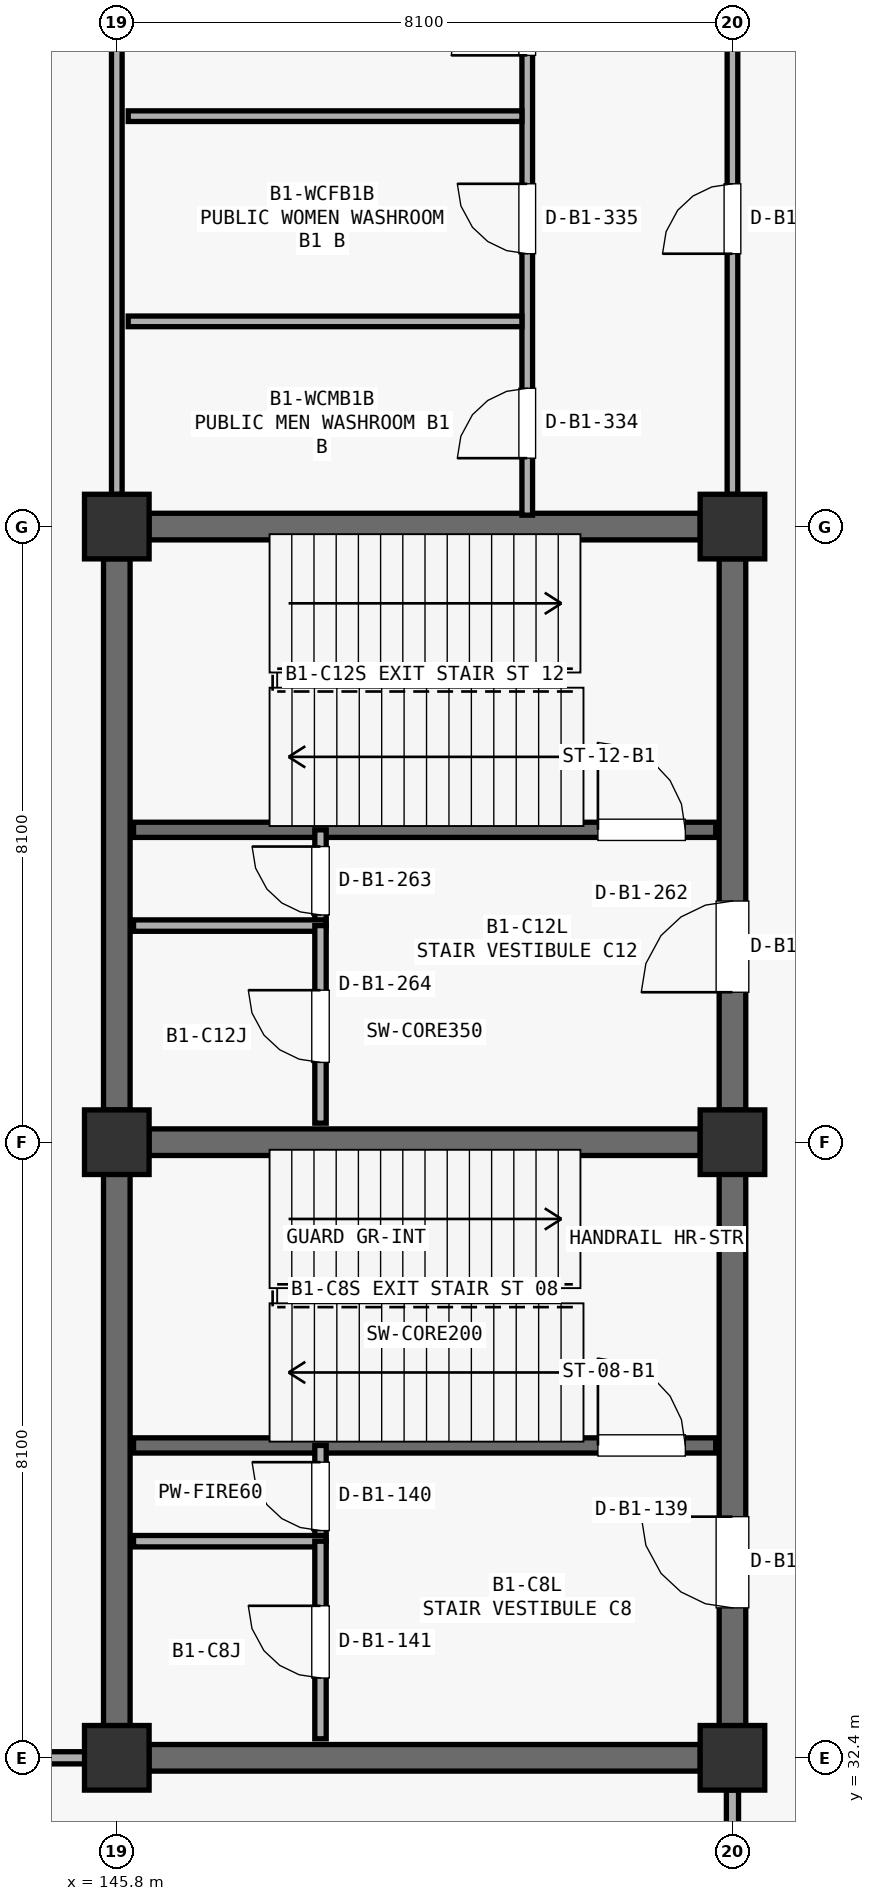
"""IFC4 building model, lengths in metres.
Left out: names, types, materials, properties, quantities, classifications, styles, units other than length and angle.
Written with IfcOpenShell. Run it as: python <this file> out.ifc"""

import sys

from ifc_helpers import new_model, si_unit, direction, frame, frame_2d, origin, origin_2d, place, context, subcontext, project, spatial, rectangle, extrude, element, fill, save


model = new_model("IFC4")
c1 = context("Model", 3, precision=1e-05, world=origin(), true_north=direction((0.0, 1.0)))
c2 = subcontext(c1, "Body", "Model", "MODEL_VIEW")
j1 = project(units=[si_unit("LENGTHUNIT", "METRE"), si_unit("PLANEANGLEUNIT", "RADIAN")], contexts=[c1])
p1 = place(None, origin())
s1 = spatial("IfcSite", under=j1, at=p1, CompositionType="ELEMENT")
p2 = place(p1, origin())
s2 = spatial("IfcBuilding", under=s1, at=p2, CompositionType="ELEMENT")
p3 = place(p2, frame((0.0, 0.0, -5.1)))
s3 = spatial("IfcBuildingStorey", under=s2, at=p3, CompositionType="ELEMENT", Elevation=-5.1)
for number, where, z_axis, x_axis in (
    (1, (145.8, 32.4, 0.0), (0.0, 0.0, 1.0), (1.0, 0.0, 0.0)),
    (2, (145.8, 40.5, 0.0), (0.0, 0.0, 1.0), (1.0, 0.0, 0.0)),
    (3, (145.8, 48.6, 0.0), (0.0, 0.0, 1.0), (1.0, 0.0, 0.0)),
    (4, (153.9, 32.4, 0.0), (0.0, 0.0, 1.0), (1.0, 0.0, 0.0)),
    (5, (153.9, 40.5, 0.0), (0.0, 0.0, 1.0), (1.0, 0.0, 0.0)),
    (6, (153.9, 48.6, 0.0), (0.0, 0.0, 1.0), (1.0, 0.0, 0.0)),
):
    element("IfcColumn", number, at=place(p3, frame(where, z_axis=z_axis, x_axis=x_axis)), inside=s3, PredefinedType="COLUMN", context=c2, shape_type="SweptSolid", body=[
        extrude(rectangle(XDim=0.85, YDim=0.85, at=origin_2d()), origin(), (0.0, 0.0, 1.0), 5.1),
    ])
p4 = place(p3, frame((146.223, 40.5, 0.0), z_axis=(0.0, 0.0, 1.0), x_axis=(1.0, 0.0, 0.0)))
e7 = element("IfcWall", 7, at=p4, inside=s3, PredefinedType="SHEAR", context=c2, shape_type="SweptSolid", body=[
    extrude(rectangle(XDim=7.254, YDim=0.35, at=frame_2d((3.627, 0.0))), origin(), (0.0, 0.0, 1.0), 4.782),
])
p5 = place(p3, frame((145.8, 32.823, 0.0), z_axis=(0.0, 0.0, 1.0), x_axis=(0.0, 1.0, 0.0)))
e8 = element("IfcWall", 8, at=p5, inside=s3, PredefinedType="SHEAR", context=c2, shape_type="SweptSolid", body=[
    extrude(rectangle(XDim=7.254, YDim=0.35, at=frame_2d((3.627, 0.0))), origin(), (0.0, 0.0, 1.0), 4.782),
])
p6 = place(p3, frame((153.9, 32.823, 0.0), z_axis=(0.0, 0.0, 1.0), x_axis=(0.0, 1.0, 0.0)))
e9 = element("IfcWall", 9, at=p6, inside=s3, PredefinedType="SHEAR", context=c2, shape_type="SweptSolid", body=[
    extrude(rectangle(XDim=7.254, YDim=0.35, at=frame_2d((3.627, 0.0))), origin(), (0.0, 0.0, 1.0), 4.782),
])
p7 = place(p6, frame((1.55, 0.0, 0.0)))
e10 = element("IfcOpeningElement", 10, at=p7, cuts=e9, PredefinedType="OPENING", context=c2, shape_type="SweptSolid", body=[
    extrude(rectangle(XDim=1.2, YDim=2.2, at=frame_2d((0.6, 1.1))), frame((0.0, 0.185, 0.0), z_axis=(0.0, -1.0, 0.0), x_axis=(1.0, 0.0, 0.0)), (0.0, 0.0, 1.0), 0.37),
])
p8 = place(p3, frame((146.223, 32.4, 0.0), z_axis=(0.0, 0.0, 1.0), x_axis=(1.0, 0.0, 0.0)))
e11 = element("IfcWall", 11, at=p8, inside=s3, PredefinedType="SHEAR", context=c2, shape_type="SweptSolid", body=[
    extrude(rectangle(XDim=7.254, YDim=0.35, at=frame_2d((3.627, 0.0))), origin(), (0.0, 0.0, 1.0), 4.782),
])
p9 = place(p3, frame((146.02, 36.51, 0.0), z_axis=(0.0, 0.0, 1.0), x_axis=(1.0, 0.0, 0.0)))
e12 = element("IfcWall", 12, at=p9, inside=s3, PredefinedType="SHEAR", context=c2, shape_type="SweptSolid", body=[
    extrude(rectangle(XDim=7.66, YDim=0.2, at=frame_2d((3.83, 0.0))), origin(), (0.0, 0.0, 1.0), 4.782),
])
p10 = place(p9, frame((6.11, 0.0, 0.0)))
e13 = element("IfcOpeningElement", 13, at=p10, cuts=e12, PredefinedType="OPENING", context=c2, shape_type="SweptSolid", body=[
    extrude(rectangle(XDim=1.15, YDim=2.2, at=frame_2d((0.575, 1.1))), frame((0.0, 0.11, 0.0), z_axis=(0.0, -1.0, 0.0), x_axis=(1.0, 0.0, 0.0)), (0.0, 0.0, 1.0), 0.22),
])
p11 = place(p3, frame((148.48, 35.25, 0.0), z_axis=(0.0, 0.0, 1.0), x_axis=(0.0, 1.0, 0.0)))
e14 = element("IfcWall", 14, at=p11, inside=s3, PredefinedType="PARTITIONING", context=c2, shape_type="SweptSolid", body=[
    extrude(rectangle(XDim=1.26, YDim=0.15, at=frame_2d((0.63, 0.0))), origin(), (0.0, 0.0, 1.0), 4.782),
])
p12 = place(p11, frame((0.14, 0.0, 0.0)))
e15 = element("IfcOpeningElement", 15, at=p12, cuts=e14, PredefinedType="OPENING", context=c2, shape_type="SweptSolid", body=[
    extrude(rectangle(XDim=0.9, YDim=2.15, at=frame_2d((0.45, 1.075))), frame((0.0, 0.085, 0.0), z_axis=(0.0, -1.0, 0.0), x_axis=(1.0, 0.0, 0.0)), (0.0, 0.0, 1.0), 0.17),
])
p13 = place(p3, frame((146.02, 35.25, 0.0), z_axis=(0.0, 0.0, 1.0), x_axis=(1.0, 0.0, 0.0)))
e16 = element("IfcWall", 16, at=p13, inside=s3, PredefinedType="PARTITIONING", context=c2, shape_type="SweptSolid", body=[
    extrude(rectangle(XDim=2.53, YDim=0.15, at=frame_2d((1.265, 0.0))), origin(), (0.0, 0.0, 1.0), 4.782),
])
p14 = place(p3, frame((148.48, 32.65, 0.0), z_axis=(0.0, 0.0, 1.0), x_axis=(0.0, 1.0, 0.0)))
e17 = element("IfcWall", 17, at=p14, inside=s3, PredefinedType="PARTITIONING", context=c2, shape_type="SweptSolid", body=[
    extrude(rectangle(XDim=2.6, YDim=0.15, at=frame_2d((1.3, 0.0))), origin(), (0.0, 0.0, 1.0), 4.782),
])
p15 = place(p14, frame((0.8, 0.0, 0.0)))
e18 = element("IfcOpeningElement", 18, at=p15, cuts=e17, PredefinedType="OPENING", context=c2, shape_type="SweptSolid", body=[
    extrude(rectangle(XDim=0.95, YDim=2.15, at=frame_2d((0.475, 1.075))), frame((0.0, 0.085, 0.0), z_axis=(0.0, -1.0, 0.0), x_axis=(1.0, 0.0, 0.0)), (0.0, 0.0, 1.0), 0.17),
])
p16 = place(p3, frame((146.223, 48.6, 0.0), z_axis=(0.0, 0.0, 1.0), x_axis=(1.0, 0.0, 0.0)))
e19 = element("IfcWall", 19, at=p16, inside=s3, PredefinedType="SHEAR", context=c2, shape_type="SweptSolid", body=[
    extrude(rectangle(XDim=7.254, YDim=0.35, at=frame_2d((3.627, 0.0))), origin(), (0.0, 0.0, 1.0), 4.782),
])
p17 = place(p3, frame((145.8, 40.923, 0.0), z_axis=(0.0, 0.0, 1.0), x_axis=(0.0, 1.0, 0.0)))
e20 = element("IfcWall", 20, at=p17, inside=s3, PredefinedType="SHEAR", context=c2, shape_type="SweptSolid", body=[
    extrude(rectangle(XDim=7.254, YDim=0.35, at=frame_2d((3.627, 0.0))), origin(), (0.0, 0.0, 1.0), 4.782),
])
p18 = place(p3, frame((153.9, 40.923, 0.0), z_axis=(0.0, 0.0, 1.0), x_axis=(0.0, 1.0, 0.0)))
e21 = element("IfcWall", 21, at=p18, inside=s3, PredefinedType="SHEAR", context=c2, shape_type="SweptSolid", body=[
    extrude(rectangle(XDim=7.254, YDim=0.35, at=frame_2d((3.627, 0.0))), origin(), (0.0, 0.0, 1.0), 4.782),
])
p19 = place(p18, frame((1.55, 0.0, 0.0)))
e22 = element("IfcOpeningElement", 22, at=p19, cuts=e21, PredefinedType="OPENING", context=c2, shape_type="SweptSolid", body=[
    extrude(rectangle(XDim=1.2, YDim=2.2, at=frame_2d((0.6, 1.1))), frame((0.0, 0.185, 0.0), z_axis=(0.0, -1.0, 0.0), x_axis=(1.0, 0.0, 0.0)), (0.0, 0.0, 1.0), 0.37),
])
p20 = place(p3, frame((146.02, 44.61, 0.0), z_axis=(0.0, 0.0, 1.0), x_axis=(1.0, 0.0, 0.0)))
e23 = element("IfcWall", 23, at=p20, inside=s3, PredefinedType="SHEAR", context=c2, shape_type="SweptSolid", body=[
    extrude(rectangle(XDim=7.66, YDim=0.2, at=frame_2d((3.83, 0.0))), origin(), (0.0, 0.0, 1.0), 4.782),
])
p21 = place(p20, frame((6.11, 0.0, 0.0)))
e24 = element("IfcOpeningElement", 24, at=p21, cuts=e23, PredefinedType="OPENING", context=c2, shape_type="SweptSolid", body=[
    extrude(rectangle(XDim=1.15, YDim=2.2, at=frame_2d((0.575, 1.1))), frame((0.0, 0.11, 0.0), z_axis=(0.0, -1.0, 0.0), x_axis=(1.0, 0.0, 0.0)), (0.0, 0.0, 1.0), 0.22),
])
p22 = place(p3, frame((148.48, 43.35, 0.0), z_axis=(0.0, 0.0, 1.0), x_axis=(0.0, 1.0, 0.0)))
e25 = element("IfcWall", 25, at=p22, inside=s3, PredefinedType="PARTITIONING", context=c2, shape_type="SweptSolid", body=[
    extrude(rectangle(XDim=1.26, YDim=0.15, at=frame_2d((0.63, 0.0))), origin(), (0.0, 0.0, 1.0), 4.782),
])
p23 = place(p22, frame((0.14, 0.0, 0.0)))
e26 = element("IfcOpeningElement", 26, at=p23, cuts=e25, PredefinedType="OPENING", context=c2, shape_type="SweptSolid", body=[
    extrude(rectangle(XDim=0.9, YDim=2.15, at=frame_2d((0.45, 1.075))), frame((0.0, 0.085, 0.0), z_axis=(0.0, -1.0, 0.0), x_axis=(1.0, 0.0, 0.0)), (0.0, 0.0, 1.0), 0.17),
])
p24 = place(p3, frame((146.02, 43.35, 0.0), z_axis=(0.0, 0.0, 1.0), x_axis=(1.0, 0.0, 0.0)))
e27 = element("IfcWall", 27, at=p24, inside=s3, PredefinedType="PARTITIONING", context=c2, shape_type="SweptSolid", body=[
    extrude(rectangle(XDim=2.53, YDim=0.15, at=frame_2d((1.265, 0.0))), origin(), (0.0, 0.0, 1.0), 4.782),
])
p25 = place(p3, frame((148.48, 40.75, 0.0), z_axis=(0.0, 0.0, 1.0), x_axis=(0.0, 1.0, 0.0)))
e28 = element("IfcWall", 28, at=p25, inside=s3, PredefinedType="PARTITIONING", context=c2, shape_type="SweptSolid", body=[
    extrude(rectangle(XDim=2.6, YDim=0.15, at=frame_2d((1.3, 0.0))), origin(), (0.0, 0.0, 1.0), 4.782),
])
p26 = place(p25, frame((0.8, 0.0, 0.0)))
e29 = element("IfcOpeningElement", 29, at=p26, cuts=e28, PredefinedType="OPENING", context=c2, shape_type="SweptSolid", body=[
    extrude(rectangle(XDim=0.95, YDim=2.15, at=frame_2d((0.475, 1.075))), frame((0.0, 0.085, 0.0), z_axis=(0.0, -1.0, 0.0), x_axis=(1.0, 0.0, 0.0)), (0.0, 0.0, 1.0), 0.17),
])
p27 = place(p3, frame((145.8, 49.023, 0.0), z_axis=(0.0, 0.0, 1.0), x_axis=(0.0, 1.0, 0.0)))
e30 = element("IfcWall", 30, at=p27, inside=s3, PredefinedType="PARTITIONING", context=c2, shape_type="SweptSolid", body=[
    extrude(rectangle(XDim=7.254, YDim=0.14, at=frame_2d((3.627, 0.0))), origin(), (0.0, 0.0, 1.0), 4.18),
])
p28 = place(p3, frame((153.9, 49.023, 0.0), z_axis=(0.0, 0.0, 1.0), x_axis=(0.0, 1.0, 0.0)))
e31 = element("IfcWall", 31, at=p28, inside=s3, PredefinedType="PARTITIONING", context=c2, shape_type="SweptSolid", body=[
    extrude(rectangle(XDim=7.254, YDim=0.14, at=frame_2d((3.627, 0.0))), origin(), (0.0, 0.0, 1.0), 3.83),
])
p29 = place(p28, frame((3.167, 0.0, 0.0)))
e32 = element("IfcOpeningElement", 32, at=p29, cuts=e31, PredefinedType="OPENING", context=c2, shape_type="SweptSolid", body=[
    extrude(rectangle(XDim=0.92, YDim=2.15, at=frame_2d((0.46, 1.075))), frame((0.0, 0.08, 0.0), z_axis=(0.0, -1.0, 0.0), x_axis=(1.0, 0.0, 0.0)), (0.0, 0.0, 1.0), 0.16),
])
p30 = place(p3, frame((151.2, 48.75, 0.0), z_axis=(0.0, 0.0, 1.0), x_axis=(0.0, 1.0, 0.0)))
e33 = element("IfcWall", 33, at=p30, inside=s3, PredefinedType="PARTITIONING", context=c2, shape_type="SweptSolid", body=[
    extrude(rectangle(XDim=7.8, YDim=0.14, at=frame_2d((3.9, 0.0))), origin(), (0.0, 0.0, 1.0), 4.782),
])
p31 = place(p30, frame((0.75, 0.0, 0.0)))
e34 = element("IfcOpeningElement", 34, at=p31, cuts=e33, PredefinedType="OPENING", context=c2, shape_type="SweptSolid", body=[
    extrude(rectangle(XDim=0.92, YDim=2.15, at=frame_2d((0.46, 1.075))), frame((0.0, 0.08, 0.0), z_axis=(0.0, -1.0, 0.0), x_axis=(1.0, 0.0, 0.0)), (0.0, 0.0, 1.0), 0.16),
])
p32 = place(p30, frame((3.44, 0.0, 0.0)))
e35 = element("IfcOpeningElement", 35, at=p32, cuts=e33, PredefinedType="OPENING", context=c2, shape_type="SweptSolid", body=[
    extrude(rectangle(XDim=0.92, YDim=2.15, at=frame_2d((0.46, 1.075))), frame((0.0, 0.08, 0.0), z_axis=(0.0, -1.0, 0.0), x_axis=(1.0, 0.0, 0.0)), (0.0, 0.0, 1.0), 0.16),
])
p33 = place(p30, frame((6.05, 0.0, 0.0)))
e36 = element("IfcOpeningElement", 36, at=p33, cuts=e33, PredefinedType="OPENING", context=c2, shape_type="SweptSolid", body=[
    extrude(rectangle(XDim=1.0, YDim=2.15, at=frame_2d((0.5, 1.075))), frame((0.0, 0.08, 0.0), z_axis=(0.0, -1.0, 0.0), x_axis=(1.0, 0.0, 0.0)), (0.0, 0.0, 1.0), 0.16),
])
for number, where, z_axis, x_axis in (
    (37, (145.95, 51.3, 0.0), (0.0, 0.0, 1.0), (1.0, 0.0, 0.0)),
    (38, (145.95, 54.0, 0.0), (0.0, 0.0, 1.0), (1.0, 0.0, 0.0)),
):
    element("IfcWall", number, at=place(p3, frame(where, z_axis=z_axis, x_axis=x_axis)), inside=s3, PredefinedType="PARTITIONING", context=c2, shape_type="SweptSolid", body=[
        extrude(rectangle(XDim=5.18, YDim=0.14, at=frame_2d((2.59, 0.0))), origin(), (0.0, 0.0, 1.0), 4.782),
    ])
p34 = place(p3, frame((153.9, 24.723, 0.0), z_axis=(0.0, 0.0, 1.0), x_axis=(0.0, 1.0, 0.0)))
e39 = element("IfcWall", 39, at=p34, inside=s3, PredefinedType="PARTITIONING", context=c2, shape_type="SweptSolid", body=[
    extrude(rectangle(XDim=7.254, YDim=0.16, at=frame_2d((3.627, 0.0))), origin(), (0.0, 0.0, 1.0), 4.132),
])
p35 = place(p3, frame((138.123, 32.4, 0.0), z_axis=(0.0, 0.0, 1.0), x_axis=(1.0, 0.0, 0.0)))
e40 = element("IfcWall", 40, at=p35, inside=s3, PredefinedType="PARTITIONING", context=c2, shape_type="SweptSolid", body=[
    extrude(rectangle(XDim=7.254, YDim=0.16, at=frame_2d((3.627, 0.0))), origin(), (0.0, 0.0, 1.0), 4.132),
])
p36 = place(p7, origin())
e41 = element("IfcDoor", 41, at=p36, inside=s3, OperationType="SINGLE_SWING_RIGHT", PredefinedType="DOOR", context=c2, shape_type="SweptSolid", body=[
    extrude(rectangle(XDim=1.2, YDim=2.2, at=frame_2d((0.6, 1.1))), frame((0.0, 0.025, 0.0), z_axis=(0.0, -1.0, 0.0), x_axis=(1.0, 0.0, 0.0)), (0.0, 0.0, 1.0), 0.05),
])
fill(e10, e41)
p37 = place(p10, origin())
e42 = element("IfcDoor", 42, at=p37, inside=s3, OperationType="SINGLE_SWING_LEFT", PredefinedType="DOOR", context=c2, shape_type="SweptSolid", body=[
    extrude(rectangle(XDim=1.15, YDim=2.2, at=frame_2d((0.575, 1.1))), frame((0.0, 0.025, 0.0), z_axis=(0.0, -1.0, 0.0), x_axis=(1.0, 0.0, 0.0)), (0.0, 0.0, 1.0), 0.05),
])
fill(e13, e42)
p38 = place(p12, origin())
e43 = element("IfcDoor", 43, at=p38, inside=s3, OperationType="SINGLE_SWING_RIGHT", PredefinedType="DOOR", context=c2, shape_type="SweptSolid", body=[
    extrude(rectangle(XDim=0.9, YDim=2.15, at=frame_2d((0.45, 1.075))), frame((0.0, 0.025, 0.0), z_axis=(0.0, -1.0, 0.0), x_axis=(1.0, 0.0, 0.0)), (0.0, 0.0, 1.0), 0.05),
])
fill(e15, e43)
p39 = place(p15, origin())
e44 = element("IfcDoor", 44, at=p39, inside=s3, OperationType="SINGLE_SWING_RIGHT", PredefinedType="DOOR", context=c2, shape_type="SweptSolid", body=[
    extrude(rectangle(XDim=0.95, YDim=2.15, at=frame_2d((0.475, 1.075))), frame((0.0, 0.025, 0.0), z_axis=(0.0, -1.0, 0.0), x_axis=(1.0, 0.0, 0.0)), (0.0, 0.0, 1.0), 0.05),
])
fill(e18, e44)
p40 = place(p19, origin())
e45 = element("IfcDoor", 45, at=p40, inside=s3, OperationType="SINGLE_SWING_LEFT", PredefinedType="DOOR", context=c2, shape_type="SweptSolid", body=[
    extrude(rectangle(XDim=1.2, YDim=2.2, at=frame_2d((0.6, 1.1))), frame((0.0, 0.025, 0.0), z_axis=(0.0, -1.0, 0.0), x_axis=(1.0, 0.0, 0.0)), (0.0, 0.0, 1.0), 0.05),
])
fill(e22, e45)
p41 = place(p21, origin())
e46 = element("IfcDoor", 46, at=p41, inside=s3, OperationType="SINGLE_SWING_LEFT", PredefinedType="DOOR", context=c2, shape_type="SweptSolid", body=[
    extrude(rectangle(XDim=1.15, YDim=2.2, at=frame_2d((0.575, 1.1))), frame((0.0, 0.025, 0.0), z_axis=(0.0, -1.0, 0.0), x_axis=(1.0, 0.0, 0.0)), (0.0, 0.0, 1.0), 0.05),
])
fill(e24, e46)
p42 = place(p23, origin())
e47 = element("IfcDoor", 47, at=p42, inside=s3, OperationType="SINGLE_SWING_RIGHT", PredefinedType="DOOR", context=c2, shape_type="SweptSolid", body=[
    extrude(rectangle(XDim=0.9, YDim=2.15, at=frame_2d((0.45, 1.075))), frame((0.0, 0.025, 0.0), z_axis=(0.0, -1.0, 0.0), x_axis=(1.0, 0.0, 0.0)), (0.0, 0.0, 1.0), 0.05),
])
fill(e26, e47)
p43 = place(p26, origin())
e48 = element("IfcDoor", 48, at=p43, inside=s3, OperationType="SINGLE_SWING_RIGHT", PredefinedType="DOOR", context=c2, shape_type="SweptSolid", body=[
    extrude(rectangle(XDim=0.95, YDim=2.15, at=frame_2d((0.475, 1.075))), frame((0.0, 0.025, 0.0), z_axis=(0.0, -1.0, 0.0), x_axis=(1.0, 0.0, 0.0)), (0.0, 0.0, 1.0), 0.05),
])
fill(e29, e48)
p44 = place(p29, origin())
e49 = element("IfcDoor", 49, at=p44, inside=s3, OperationType="SINGLE_SWING_LEFT", PredefinedType="DOOR", context=c2, shape_type="SweptSolid", body=[
    extrude(rectangle(XDim=0.92, YDim=2.15, at=frame_2d((0.46, 1.075))), frame((0.0, 0.025, 0.0), z_axis=(0.0, -1.0, 0.0), x_axis=(1.0, 0.0, 0.0)), (0.0, 0.0, 1.0), 0.05),
])
fill(e32, e49)
p45 = place(p31, origin())
e50 = element("IfcDoor", 50, at=p45, inside=s3, OperationType="SINGLE_SWING_LEFT", PredefinedType="DOOR", context=c2, shape_type="SweptSolid", body=[
    extrude(rectangle(XDim=0.92, YDim=2.15, at=frame_2d((0.46, 1.075))), frame((0.0, 0.025, 0.0), z_axis=(0.0, -1.0, 0.0), x_axis=(1.0, 0.0, 0.0)), (0.0, 0.0, 1.0), 0.05),
])
fill(e34, e50)
p46 = place(p32, origin())
e51 = element("IfcDoor", 51, at=p46, inside=s3, OperationType="SINGLE_SWING_RIGHT", PredefinedType="DOOR", context=c2, shape_type="SweptSolid", body=[
    extrude(rectangle(XDim=0.92, YDim=2.15, at=frame_2d((0.46, 1.075))), frame((0.0, 0.025, 0.0), z_axis=(0.0, -1.0, 0.0), x_axis=(1.0, 0.0, 0.0)), (0.0, 0.0, 1.0), 0.05),
])
fill(e35, e51)
p47 = place(p33, origin())
e52 = element("IfcDoor", 52, at=p47, inside=s3, OperationType="SINGLE_SWING_LEFT", PredefinedType="DOOR", context=c2, shape_type="SweptSolid", body=[
    extrude(rectangle(XDim=1.0, YDim=2.15, at=frame_2d((0.5, 1.075))), frame((0.0, 0.025, 0.0), z_axis=(0.0, -1.0, 0.0), x_axis=(1.0, 0.0, 0.0)), (0.0, 0.0, 1.0), 0.05),
])
fill(e36, e52)
save(model, sys.argv[1])
